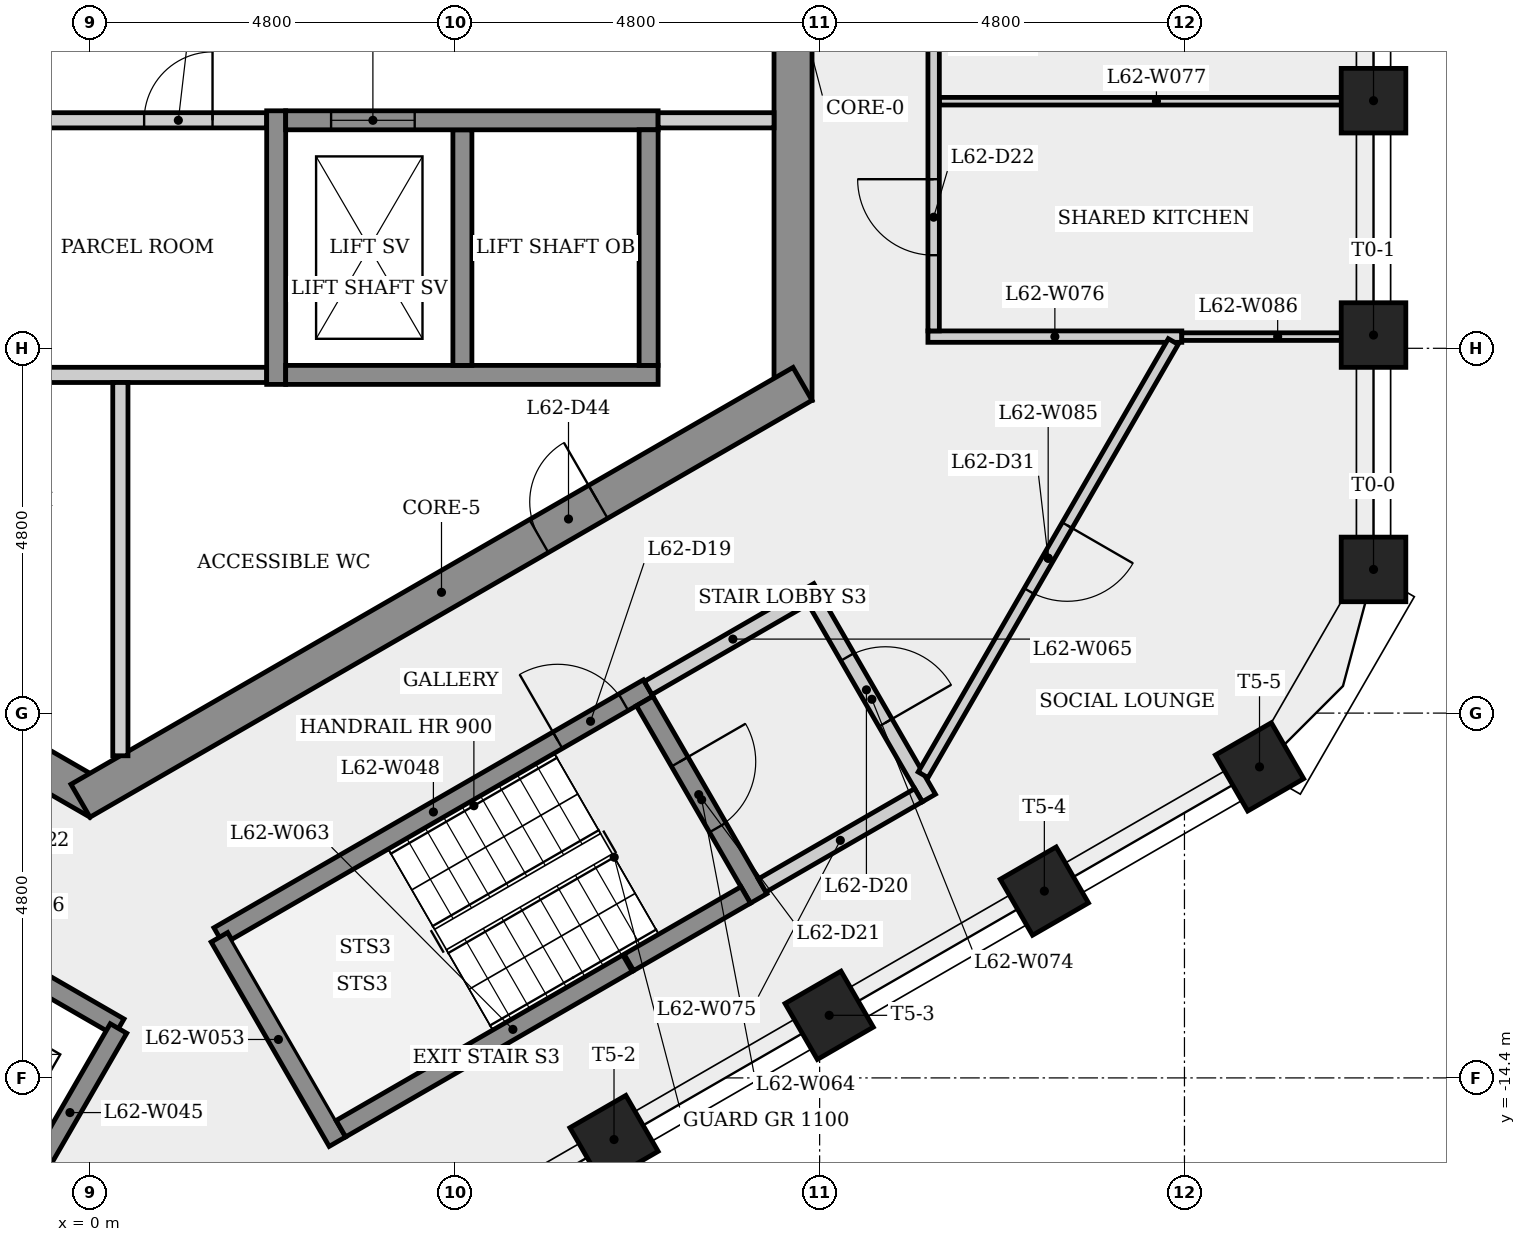
"""IFC4 building model, lengths in metres.
Left out: names, types, materials, properties, quantities, classifications, styles, units other than length and angle.
Written with IfcOpenShell. Run it as: python <this file> out.ifc"""

import sys

from ifc_helpers import new_model, si_unit, direction, frame, frame_2d, origin, origin_2d, place, context, subcontext, project, spatial, rectangle, extrude, element, fill, save


model = new_model("IFC4")
c1 = context("Model", 3, precision=1e-05, world=origin(), true_north=direction((0.0, 1.0)))
c2 = subcontext(c1, "Body", "Model", "MODEL_VIEW")
j1 = project(units=[si_unit("LENGTHUNIT", "METRE"), si_unit("PLANEANGLEUNIT", "RADIAN")], contexts=[c1])
p1 = place(None, origin())
s1 = spatial("IfcSite", under=j1, at=p1, CompositionType="ELEMENT")
p2 = place(p1, origin())
s2 = spatial("IfcBuilding", under=s1, at=p2, CompositionType="ELEMENT")
p3 = place(p2, frame((0.0, 0.0, 232.5)))
s3 = spatial("IfcBuildingStorey", under=s2, at=p3, CompositionType="ELEMENT", Elevation=232.5)
p4 = place(p3, frame((9.25, -5.485, 0.0), z_axis=(0.0, 0.0, 1.0), x_axis=(0.0, 1.0, 0.0)))
e1 = element("IfcWall", 1, at=p4, inside=s3, PredefinedType="SHEAR", context=c2, shape_type="SweptSolid", body=[
    extrude(rectangle(XDim=10.97, YDim=0.5, at=frame_2d((5.485, 0.0))), origin(), (0.0, 0.0, 1.0), 3.4),
])
p5 = place(p4, frame((4.685, 0.0, 0.0)))
e2 = element("IfcOpeningElement", 2, at=p5, cuts=e1, PredefinedType="OPENING", context=c2, shape_type="SweptSolid", body=[
    extrude(rectangle(XDim=1.6, YDim=2.1, at=frame_2d((0.8, 1.05))), frame((0.0, 0.26, 0.0), z_axis=(0.0, -1.0, 0.0), x_axis=(1.0, 0.0, 0.0)), (0.0, 0.0, 1.0), 0.52),
])
p6 = place(p3, frame((-9.375, -5.268, 0.0), z_axis=(0.0, 0.0, 1.0), x_axis=(0.866023993627, -0.500002442456, 0.0)))
e3 = element("IfcWall", 3, at=p6, inside=s3, PredefinedType="SHEAR", context=c2, shape_type="SweptSolid", body=[
    extrude(rectangle(XDim=10.97, YDim=0.5, at=frame_2d((5.485, 0.0))), origin(), (0.0, 0.0, 1.0), 3.4),
])
p7 = place(p6, frame((3.073, 0.0, 0.0)))
e4 = element("IfcOpeningElement", 4, at=p7, cuts=e3, PredefinedType="OPENING", context=c2, shape_type="SweptSolid", body=[
    extrude(rectangle(XDim=0.9, YDim=2.1, at=frame_2d((0.45, 1.05))), frame((0.0, 0.26, 0.0), z_axis=(0.0, -1.0, 0.0), x_axis=(1.0, 0.0, 0.0)), (0.0, 0.0, 1.0), 0.52),
])
p8 = place(p6, frame((8.267, 0.0, 0.0)))
e5 = element("IfcOpeningElement", 5, at=p8, cuts=e3, PredefinedType="OPENING", context=c2, shape_type="SweptSolid", body=[
    extrude(rectangle(XDim=0.9, YDim=2.1, at=frame_2d((0.45, 1.05))), frame((0.0, 0.26, 0.0), z_axis=(0.0, -1.0, 0.0), x_axis=(1.0, 0.0, 0.0)), (0.0, 0.0, 1.0), 0.52),
])
p9 = place(p3, frame((-0.125, -10.753, 0.0), z_axis=(0.0, 0.0, 1.0), x_axis=(0.866023993627, 0.500002442456, 0.0)))
e6 = element("IfcWall", 6, at=p9, inside=s3, PredefinedType="SHEAR", context=c2, shape_type="SweptSolid", body=[
    extrude(rectangle(XDim=10.97, YDim=0.5, at=frame_2d((5.485, 0.0))), origin(), (0.0, 0.0, 1.0), 3.4),
])
p10 = place(p9, frame((6.964, 0.0, 0.0)))
e7 = element("IfcOpeningElement", 7, at=p10, cuts=e6, PredefinedType="OPENING", context=c2, shape_type="SweptSolid", body=[
    extrude(rectangle(XDim=0.9, YDim=2.1, at=frame_2d((0.45, 1.05))), frame((0.0, 0.26, 0.0), z_axis=(0.0, -1.0, 0.0), x_axis=(1.0, 0.0, 0.0)), (0.0, 0.0, 1.0), 0.52),
])
for number, where, z_axis, x_axis in (
    (8, (16.887, -7.709, 0.0), (0.0, 0.0, 1.0), (1.0, 0.0, 0.0)),
    (9, (16.887, -4.626, 0.0), (0.0, 0.0, 1.0), (1.0, 0.0, 0.0)),
    (10, (16.887, -1.542, 0.0), (0.0, 0.0, 1.0), (1.0, 0.0, 0.0)),
    (11, (6.895, -15.211, 0.0), (0.0, 0.0, 1.0), (0.5, -0.866, 0.0)),
    (12, (9.726, -13.576, 0.0), (0.0, 0.0, 1.0), (0.5, -0.866, 0.0)),
    (13, (12.557, -11.942, 0.0), (0.0, 0.0, 1.0), (0.5, -0.866, 0.0)),
    (14, (15.387, -10.308, 0.0), (0.0, 0.0, 1.0), (0.5, -0.866, 0.0)),
):
    element("IfcColumn", number, at=place(p3, frame(where, z_axis=z_axis, x_axis=x_axis)), inside=s3, PredefinedType="COLUMN", context=c2, shape_type="SweptSolid", body=[
        extrude(rectangle(XDim=0.85, YDim=0.85, at=origin_2d()), origin(), (0.0, 0.0, 1.0), 3.4),
    ])
p11 = place(p3, frame((-9.0, -5.15, 0.0), z_axis=(0.0, 0.0, 1.0), x_axis=(1.0, 0.0, 0.0)))
e15 = element("IfcWall", 15, at=p11, inside=s3, PredefinedType="PARTITIONING", context=c2, shape_type="SweptSolid", body=[
    extrude(rectangle(XDim=11.325, YDim=0.2, at=frame_2d((5.663, 0.0))), origin(), (0.0, 0.0, 1.0), 3.05),
])
p12 = place(p3, frame((-9.0, -1.8, 0.0), z_axis=(0.0, 0.0, 1.0), x_axis=(1.0, 0.0, 0.0)))
e16 = element("IfcWall", 16, at=p12, inside=s3, PredefinedType="PARTITIONING", context=c2, shape_type="SweptSolid", body=[
    extrude(rectangle(XDim=11.325, YDim=0.2, at=frame_2d((5.663, 0.0))), origin(), (0.0, 0.0, 1.0), 3.05),
])
p13 = place(p12, frame((2.185, 0.0, 0.0)))
e17 = element("IfcOpeningElement", 17, at=p13, cuts=e16, PredefinedType="OPENING", context=c2, shape_type="SweptSolid", body=[
    extrude(rectangle(XDim=0.9, YDim=2.1, at=frame_2d((0.45, 1.05))), frame((0.0, 0.11, 0.0), z_axis=(0.0, -1.0, 0.0), x_axis=(1.0, 0.0, 0.0)), (0.0, 0.0, 1.0), 0.22),
])
p14 = place(p12, frame((6.71, 0.0, 0.0)))
e18 = element("IfcOpeningElement", 18, at=p14, cuts=e16, PredefinedType="OPENING", context=c2, shape_type="SweptSolid", body=[
    extrude(rectangle(XDim=0.9, YDim=2.1, at=frame_2d((0.45, 1.05))), frame((0.0, 0.11, 0.0), z_axis=(0.0, -1.0, 0.0), x_axis=(1.0, 0.0, 0.0)), (0.0, 0.0, 1.0), 0.22),
])
p15 = place(p12, frame((9.713, 0.0, 0.0)))
e19 = element("IfcOpeningElement", 19, at=p15, cuts=e16, PredefinedType="OPENING", context=c2, shape_type="SweptSolid", body=[
    extrude(rectangle(XDim=0.9, YDim=2.1, at=frame_2d((0.45, 1.05))), frame((0.0, 0.11, 0.0), z_axis=(0.0, -1.0, 0.0), x_axis=(1.0, 0.0, 0.0)), (0.0, 0.0, 1.0), 0.22),
])
p16 = place(p3, frame((-2.364, -12.145, 0.0), z_axis=(0.0, 0.0, 1.0), x_axis=(0.866048579423, -0.499959856469, 0.0)))
e20 = element("IfcWall", 20, at=p16, inside=s3, PredefinedType="SHEAR", context=c2, shape_type="SweptSolid", body=[
    extrude(rectangle(XDim=3.175, YDim=0.25, at=frame_2d((1.587, 0.0))), origin(), (0.0, 0.0, 1.0), 3.4),
])
p17 = place(p3, frame((0.375, -13.75, 0.0), z_axis=(0.0, 0.0, 1.0), x_axis=(-0.50003400563, -0.866005769735, 0.0)))
e21 = element("IfcWall", 21, at=p17, inside=s3, PredefinedType="SHEAR", context=c2, shape_type="SweptSolid", body=[
    extrude(rectangle(XDim=2.555, YDim=0.25, at=frame_2d((1.277, 0.0))), origin(), (0.0, 0.0, 1.0), 3.4),
])
p18 = place(p3, frame((0.4, -5.25, 0.0), z_axis=(0.0, 0.0, 1.0), x_axis=(0.0, -1.0, 0.0)))
e22 = element("IfcWall", 22, at=p18, inside=s3, PredefinedType="PARTITIONING", context=c2, shape_type="SweptSolid", body=[
    extrude(rectangle(XDim=4.911, YDim=0.2, at=frame_2d((2.456, 0.0))), origin(), (0.0, 0.0, 1.0), 3.05),
])
p19 = place(p3, frame((1.693, -12.532, 0.0), z_axis=(0.0, 0.0, 1.0), x_axis=(0.866031063448, 0.499990197047, 0.0)))
e23 = element("IfcWall", 23, at=p19, inside=s3, PredefinedType="SHEAR", context=c2, shape_type="SweptSolid", body=[
    extrude(rectangle(XDim=6.525, YDim=0.25, at=frame_2d((3.263, 0.0))), origin(), (0.0, 0.0, 1.0), 3.05),
])
p20 = place(p19, frame((5.15, 0.0, 0.0)))
e24 = element("IfcOpeningElement", 24, at=p20, cuts=e23, PredefinedType="OPENING", context=c2, shape_type="SweptSolid", body=[
    extrude(rectangle(XDim=1.0, YDim=2.1, at=frame_2d((0.5, 1.05))), frame((0.0, 0.135, 0.0), z_axis=(0.0, -1.0, 0.0), x_axis=(1.0, 0.0, 0.0)), (0.0, 0.0, 1.0), 0.27),
])
p21 = place(p3, frame((2.45, -5.275, 0.0), z_axis=(0.0, 0.0, 1.0), x_axis=(0.0, 1.0, 0.0)))
e25 = element("IfcWall", 25, at=p21, inside=s3, PredefinedType="SHEAR", context=c2, shape_type="SweptSolid", body=[
    extrude(rectangle(XDim=3.6, YDim=0.25, at=frame_2d((1.8, 0.0))), origin(), (0.0, 0.0, 1.0), 3.05),
])
p22 = place(p3, frame((3.256, -15.239, 0.0), z_axis=(0.0, 0.0, 1.0), x_axis=(-0.500003782172, 0.866023220135, 0.0)))
e26 = element("IfcWall", 26, at=p22, inside=s3, PredefinedType="SHEAR", context=c2, shape_type="SweptSolid", body=[
    extrude(rectangle(XDim=3.105, YDim=0.25, at=frame_2d((1.552, 0.0))), origin(), (0.0, 0.0, 1.0), 3.05),
])
p23 = place(p3, frame((2.575, -5.15, 0.0), z_axis=(0.0, 0.0, 1.0), x_axis=(1.0, 0.0, 0.0)))
e27 = element("IfcWall", 27, at=p23, inside=s3, PredefinedType="SHEAR", context=c2, shape_type="SweptSolid", body=[
    extrude(rectangle(XDim=4.9, YDim=0.25, at=frame_2d((2.45, 0.0))), origin(), (0.0, 0.0, 1.0), 3.05),
])
p24 = place(p3, frame((4.9, -1.925, 0.0), z_axis=(0.0, 0.0, 1.0), x_axis=(0.0, -1.0, 0.0)))
e28 = element("IfcWall", 28, at=p24, inside=s3, PredefinedType="SHEAR", context=c2, shape_type="SweptSolid", body=[
    extrude(rectangle(XDim=3.1, YDim=0.25, at=frame_2d((1.55, 0.0))), origin(), (0.0, 0.0, 1.0), 3.4),
])
p25 = place(p3, frame((2.575, -1.8, 0.0), z_axis=(0.0, 0.0, 1.0), x_axis=(1.0, 0.0, 0.0)))
e29 = element("IfcWall", 29, at=p25, inside=s3, PredefinedType="SHEAR", context=c2, shape_type="SweptSolid", body=[
    extrude(rectangle(XDim=4.9, YDim=0.25, at=frame_2d((2.45, 0.0))), origin(), (0.0, 0.0, 1.0), 3.05),
])
p26 = place(p25, frame((0.597, 0.0, 0.0)))
e30 = element("IfcOpeningElement", 30, at=p26, cuts=e29, PredefinedType="OPENING", context=c2, shape_type="SweptSolid", body=[
    extrude(rectangle(XDim=1.1, YDim=2.1, at=frame_2d((0.55, 1.05))), frame((0.0, 0.135, 0.0), z_axis=(0.0, -1.0, 0.0), x_axis=(1.0, 0.0, 0.0)), (0.0, 0.0, 1.0), 0.27),
])
p27 = place(p3, frame((7.073, -12.891, 0.0), z_axis=(0.0, 0.0, 1.0), x_axis=(-0.866023145199, -0.500003911965, 0.0)))
e31 = element("IfcWall", 31, at=p27, inside=s3, PredefinedType="SHEAR", context=c2, shape_type="SweptSolid", body=[
    extrude(rectangle(XDim=4.355, YDim=0.25, at=frame_2d((2.177, 0.0))), origin(), (0.0, 0.0, 1.0), 3.05),
])
p28 = place(p3, frame((7.298, -9.441, 0.0), z_axis=(0.0, 0.0, 1.0), x_axis=(0.50002537861, -0.866010750942, 0.0)))
e32 = element("IfcWall", 32, at=p28, inside=s3, PredefinedType="SHEAR", context=c2, shape_type="SweptSolid", body=[
    extrude(rectangle(XDim=3.0, YDim=0.25, at=frame_2d((1.5, 0.0))), origin(), (0.0, 0.0, 1.0), 3.05),
])
p29 = place(p28, frame((0.923, 0.0, 0.0)))
e33 = element("IfcOpeningElement", 33, at=p29, cuts=e32, PredefinedType="OPENING", context=c2, shape_type="SweptSolid", body=[
    extrude(rectangle(XDim=1.0, YDim=2.1, at=frame_2d((0.5, 1.05))), frame((0.0, 0.135, 0.0), z_axis=(0.0, -1.0, 0.0), x_axis=(1.0, 0.0, 0.0)), (0.0, 0.0, 1.0), 0.27),
])
p30 = place(p3, frame((7.344, -9.27, 0.0), z_axis=(0.0, 0.0, 1.0), x_axis=(0.866005588531, 0.500034319456, 0.0)))
e34 = element("IfcWall", 34, at=p30, inside=s3, PredefinedType="PARTITIONING", context=c2, shape_type="SweptSolid", body=[
    extrude(rectangle(XDim=2.575, YDim=0.2, at=frame_2d((1.288, 0.0))), origin(), (0.0, 0.0, 1.0), 3.05),
])
p31 = place(p3, frame((7.35, -1.925, 0.0), z_axis=(0.0, 0.0, 1.0), x_axis=(0.0, -1.0, 0.0)))
e35 = element("IfcWall", 35, at=p31, inside=s3, PredefinedType="SHEAR", context=c2, shape_type="SweptSolid", body=[
    extrude(rectangle(XDim=3.1, YDim=0.25, at=frame_2d((1.55, 0.0))), origin(), (0.0, 0.0, 1.0), 3.4),
])
p32 = place(p3, frame((8.627, -11.993, 0.0), z_axis=(0.0, 0.0, 1.0), x_axis=(-0.866059624469, -0.499940723351, 0.0)))
e36 = element("IfcWall", 36, at=p32, inside=s3, PredefinedType="SHEAR", context=c2, shape_type="SweptSolid", body=[
    extrude(rectangle(XDim=1.775, YDim=0.25, at=frame_2d((0.888, 0.0))), origin(), (0.0, 0.0, 1.0), 3.05),
])
p33 = place(p3, frame((9.0, -1.8, 0.0), z_axis=(0.0, 0.0, 1.0), x_axis=(-1.0, 0.0, 0.0)))
e37 = element("IfcWall", 37, at=p33, inside=s3, PredefinedType="PARTITIONING", context=c2, shape_type="SweptSolid", body=[
    extrude(rectangle(XDim=1.525, YDim=0.2, at=frame_2d((0.763, 0.0))), origin(), (0.0, 0.0, 1.0), 3.05),
])
p34 = place(p3, frame((9.537, -8.119, 0.0), z_axis=(0.0, 0.0, 1.0), x_axis=(0.499990139034, -0.866031096941, 0.0)))
e38 = element("IfcWall", 38, at=p34, inside=s3, PredefinedType="PARTITIONING", context=c2, shape_type="SweptSolid", body=[
    extrude(rectangle(XDim=3.0, YDim=0.2, at=frame_2d((1.5, 0.0))), origin(), (0.0, 0.0, 1.0), 3.05),
])
p35 = place(p34, frame((0.857, 0.0, 0.0)))
e39 = element("IfcOpeningElement", 39, at=p35, cuts=e38, PredefinedType="OPENING", context=c2, shape_type="SweptSolid", body=[
    extrude(rectangle(XDim=1.0, YDim=2.1, at=frame_2d((0.5, 1.05))), frame((0.0, 0.11, 0.0), z_axis=(0.0, -1.0, 0.0), x_axis=(1.0, 0.0, 0.0)), (0.0, 0.0, 1.0), 0.22),
])
p36 = place(p3, frame((10.901, -10.681, 0.0), z_axis=(0.0, 0.0, 1.0), x_axis=(-0.866007538022, -0.500030943131, 0.0)))
e40 = element("IfcWall", 40, at=p36, inside=s3, PredefinedType="PARTITIONING", context=c2, shape_type="SweptSolid", body=[
    extrude(rectangle(XDim=2.375, YDim=0.2, at=frame_2d((1.188, 0.0))), origin(), (0.0, 0.0, 1.0), 3.05),
])
p37 = place(p3, frame((11.025, -4.646, 0.0), z_axis=(0.0, 0.0, 1.0), x_axis=(1.0, 0.0, 0.0)))
e41 = element("IfcWall", 41, at=p37, inside=s3, PredefinedType="PARTITIONING", context=c2, shape_type="SweptSolid", body=[
    extrude(rectangle(XDim=3.34, YDim=0.15, at=frame_2d((1.67, 0.0))), origin(), (0.0, 0.0, 1.0), 3.05),
])
p38 = place(p3, frame((11.175, -1.549, 0.0), z_axis=(0.0, 0.0, 1.0), x_axis=(1.0, 0.0, 0.0)))
e42 = element("IfcWall", 42, at=p38, inside=s3, PredefinedType="PARTITIONING", context=c2, shape_type="SweptSolid", body=[
    extrude(rectangle(XDim=5.712, YDim=0.1, at=frame_2d((2.856, 0.0))), origin(), (0.0, 0.0, 1.0), 3.05),
])
p39 = place(p3, frame((11.1, -4.571, 0.0), z_axis=(0.0, 0.0, 1.0), x_axis=(0.0, 1.0, 0.0)))
e43 = element("IfcWall", 43, at=p39, inside=s3, PredefinedType="PARTITIONING", context=c2, shape_type="SweptSolid", body=[
    extrude(rectangle(XDim=9.292, YDim=0.15, at=frame_2d((4.646, 0.0))), origin(), (0.0, 0.0, 1.0), 3.05),
])
p40 = place(p39, frame((0.996, 0.0, 0.0)))
e44 = element("IfcOpeningElement", 44, at=p40, cuts=e43, PredefinedType="OPENING", context=c2, shape_type="SweptSolid", body=[
    extrude(rectangle(XDim=1.0, YDim=2.1, at=frame_2d((0.5, 1.05))), frame((0.0, 0.085, 0.0), z_axis=(0.0, -1.0, 0.0), x_axis=(1.0, 0.0, 0.0)), (0.0, 0.0, 1.0), 0.17),
])
p41 = place(p39, frame((4.071, 0.0, 0.0)))
e45 = element("IfcOpeningElement", 45, at=p41, cuts=e43, PredefinedType="OPENING", context=c2, shape_type="SweptSolid", body=[
    extrude(rectangle(XDim=1.0, YDim=2.1, at=frame_2d((0.5, 1.05))), frame((0.0, 0.085, 0.0), z_axis=(0.0, -1.0, 0.0), x_axis=(1.0, 0.0, 0.0)), (0.0, 0.0, 1.0), 0.17),
])
p42 = place(p39, frame((7.169, 0.0, 0.0)))
e46 = element("IfcOpeningElement", 46, at=p42, cuts=e43, PredefinedType="OPENING", context=c2, shape_type="SweptSolid", body=[
    extrude(rectangle(XDim=1.0, YDim=2.1, at=frame_2d((0.5, 1.05))), frame((0.0, 0.085, 0.0), z_axis=(0.0, -1.0, 0.0), x_axis=(1.0, 0.0, 0.0)), (0.0, 0.0, 1.0), 0.17),
])
p43 = place(p3, frame((14.253, -4.711, 0.0), z_axis=(0.0, 0.0, 1.0), x_axis=(-0.500008173903, -0.866020684528, 0.0)))
e47 = element("IfcWall", 47, at=p43, inside=s3, PredefinedType="PARTITIONING", context=c2, shape_type="SweptSolid", body=[
    extrude(rectangle(XDim=6.583, YDim=0.15, at=frame_2d((3.292, 0.0))), origin(), (0.0, 0.0, 1.0), 3.05),
])
p44 = place(p43, frame((2.792, 0.0, 0.0)))
e48 = element("IfcOpeningElement", 48, at=p44, cuts=e47, PredefinedType="OPENING", context=c2, shape_type="SweptSolid", body=[
    extrude(rectangle(XDim=1.0, YDim=2.1, at=frame_2d((0.5, 1.05))), frame((0.0, 0.085, 0.0), z_axis=(0.0, -1.0, 0.0), x_axis=(1.0, 0.0, 0.0)), (0.0, 0.0, 1.0), 0.17),
])
p45 = place(p3, frame((16.887, -4.646, 0.0), z_axis=(0.0, 0.0, 1.0), x_axis=(-1.0, 0.0, 0.0)))
e49 = element("IfcWall", 49, at=p45, inside=s3, PredefinedType="PARTITIONING", context=c2, shape_type="SweptSolid", body=[
    extrude(rectangle(XDim=2.522, YDim=0.1, at=frame_2d((1.261, 0.0))), origin(), (0.0, 0.0, 1.0), 3.05),
])
p46 = place(p26, origin())
e50 = element("IfcDoor", 50, at=p46, inside=s3, OperationType="SLIDING_TO_LEFT", PredefinedType="DOOR", context=c2, shape_type="SweptSolid", body=[
    extrude(rectangle(XDim=1.1, YDim=2.1, at=frame_2d((0.55, 1.05))), frame((0.0, 0.025, 0.0), z_axis=(0.0, -1.0, 0.0), x_axis=(1.0, 0.0, 0.0)), (0.0, 0.0, 1.0), 0.05),
])
fill(e30, e50)
p47 = place(p15, origin())
e51 = element("IfcDoor", 51, at=p47, inside=s3, OperationType="SINGLE_SWING_RIGHT", PredefinedType="DOOR", context=c2, shape_type="SweptSolid", body=[
    extrude(rectangle(XDim=0.9, YDim=2.1, at=frame_2d((0.45, 1.05))), frame((0.0, 0.025, 0.0), z_axis=(0.0, -1.0, 0.0), x_axis=(1.0, 0.0, 0.0)), (0.0, 0.0, 1.0), 0.05),
])
fill(e19, e51)
p48 = place(p20, origin())
e52 = element("IfcDoor", 52, at=p48, inside=s3, OperationType="SINGLE_SWING_LEFT", PredefinedType="DOOR", context=c2, shape_type="SweptSolid", body=[
    extrude(rectangle(XDim=1.0, YDim=2.1, at=frame_2d((0.5, 1.05))), frame((0.0, 0.025, 0.0), z_axis=(0.0, -1.0, 0.0), x_axis=(1.0, 0.0, 0.0)), (0.0, 0.0, 1.0), 0.05),
])
fill(e24, e52)
p49 = place(p35, origin())
e53 = element("IfcDoor", 53, at=p49, inside=s3, OperationType="SINGLE_SWING_RIGHT", PredefinedType="DOOR", context=c2, shape_type="SweptSolid", body=[
    extrude(rectangle(XDim=1.0, YDim=2.1, at=frame_2d((0.5, 1.05))), frame((0.0, 0.025, 0.0), z_axis=(0.0, -1.0, 0.0), x_axis=(1.0, 0.0, 0.0)), (0.0, 0.0, 1.0), 0.05),
])
fill(e39, e53)
p50 = place(p29, origin())
e54 = element("IfcDoor", 54, at=p50, inside=s3, OperationType="SINGLE_SWING_LEFT", PredefinedType="DOOR", context=c2, shape_type="SweptSolid", body=[
    extrude(rectangle(XDim=1.0, YDim=2.1, at=frame_2d((0.5, 1.05))), frame((0.0, 0.025, 0.0), z_axis=(0.0, -1.0, 0.0), x_axis=(1.0, 0.0, 0.0)), (0.0, 0.0, 1.0), 0.05),
])
fill(e33, e54)
p51 = place(p40, origin())
e55 = element("IfcDoor", 55, at=p51, inside=s3, OperationType="SINGLE_SWING_RIGHT", PredefinedType="DOOR", context=c2, shape_type="SweptSolid", body=[
    extrude(rectangle(XDim=1.0, YDim=2.1, at=frame_2d((0.5, 1.05))), frame((0.0, 0.025, 0.0), z_axis=(0.0, -1.0, 0.0), x_axis=(1.0, 0.0, 0.0)), (0.0, 0.0, 1.0), 0.05),
])
fill(e44, e55)
p52 = place(p44, origin())
e56 = element("IfcDoor", 56, at=p52, inside=s3, OperationType="SINGLE_SWING_LEFT", PredefinedType="DOOR", context=c2, shape_type="SweptSolid", body=[
    extrude(rectangle(XDim=1.0, YDim=2.1, at=frame_2d((0.5, 1.05))), frame((0.0, 0.025, 0.0), z_axis=(0.0, -1.0, 0.0), x_axis=(1.0, 0.0, 0.0)), (0.0, 0.0, 1.0), 0.05),
])
fill(e48, e56)
p53 = place(p10, origin())
e57 = element("IfcDoor", 57, at=p53, inside=s3, OperationType="SINGLE_SWING_RIGHT", PredefinedType="DOOR", context=c2, shape_type="SweptSolid", body=[
    extrude(rectangle(XDim=0.9, YDim=2.1, at=frame_2d((0.45, 1.05))), frame((0.0, 0.025, 0.0), z_axis=(0.0, -1.0, 0.0), x_axis=(1.0, 0.0, 0.0)), (0.0, 0.0, 1.0), 0.05),
])
fill(e7, e57)
save(model, sys.argv[1])
